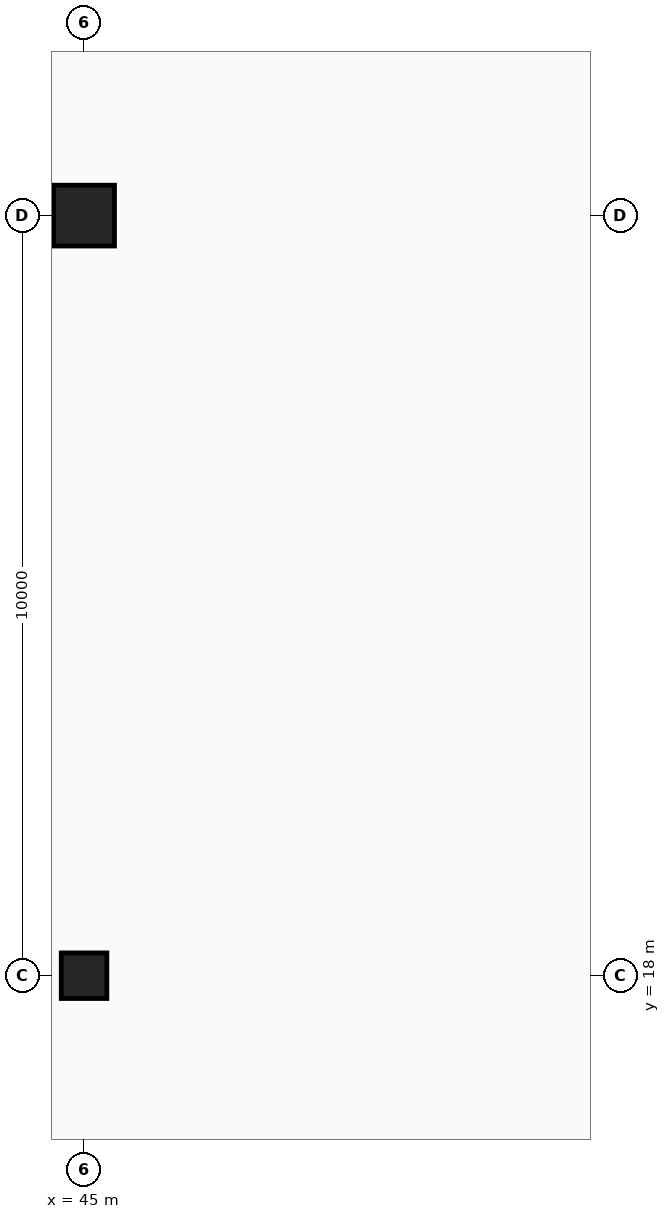
"""IFC4 building model, lengths in metres.
Left out: names, types, materials, properties, quantities, classifications, styles, units other than length and angle.
Written with IfcOpenShell. Run it as: python <this file> out.ifc"""

import sys

from ifc_helpers import new_model, si_unit, direction, frame, origin, origin_2d, place, context, subcontext, project, spatial, rectangle, extrude, element, save


model = new_model("IFC4")
c1 = context("Model", 3, precision=1e-05, world=origin(), true_north=direction((0.0, 1.0)))
c2 = subcontext(c1, "Body", "Model", "MODEL_VIEW")
j1 = project(units=[si_unit("LENGTHUNIT", "METRE"), si_unit("PLANEANGLEUNIT", "RADIAN")], contexts=[c1])
p1 = place(None, origin())
s1 = spatial("IfcSite", under=j1, at=p1, CompositionType="ELEMENT")
p2 = place(p1, origin())
s2 = spatial("IfcBuilding", under=s1, at=p2, CompositionType="ELEMENT")
p3 = place(p2, frame((0.0, 0.0, -5.1)))
s3 = spatial("IfcBuildingStorey", under=s2, at=p3, CompositionType="ELEMENT", Elevation=-5.1)
p4 = place(p3, frame((45.0, 18.0, 0.0), z_axis=(0.0, 0.0, 1.0), x_axis=(1.0, 0.0, 0.0)))
e1 = element("IfcColumn", 1, at=p4, inside=s3, PredefinedType="COLUMN", context=c2, shape_type="SweptSolid", body=[
    extrude(rectangle(XDim=0.6, YDim=0.6, at=origin_2d()), origin(), (0.0, 0.0, 1.0), 5.1),
])
p5 = place(p3, frame((45.0, 28.0, 0.0), z_axis=(0.0, 0.0, 1.0), x_axis=(1.0, 0.0, 0.0)))
e2 = element("IfcColumn", 2, at=p5, inside=s3, PredefinedType="COLUMN", context=c2, shape_type="SweptSolid", body=[
    extrude(rectangle(XDim=0.8, YDim=0.8, at=origin_2d()), origin(), (0.0, 0.0, 1.0), 5.1),
])
save(model, sys.argv[1])
